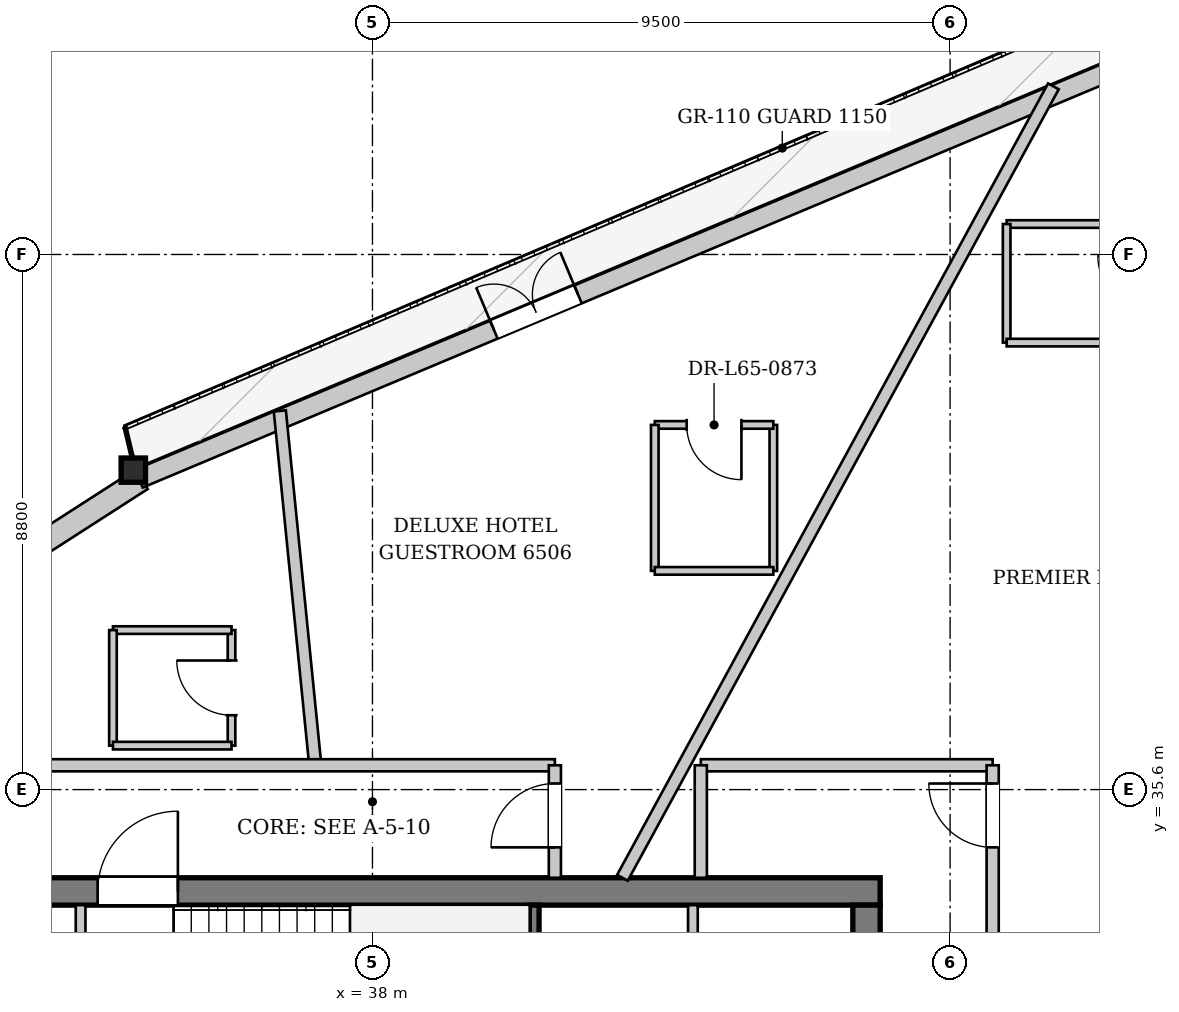
"""IFC4 building model, lengths in metres.
Left out: names, types, materials, properties, quantities, classifications, styles, units other than length and angle.
Written with IfcOpenShell. Run it as: python <this file> out.ifc"""

import sys

from ifc_helpers import new_model, si_unit, direction, frame, frame_2d, origin, origin_2d, place, context, subcontext, project, spatial, rectangle, i_section, extrude, source, transform, mapped, element, fill, save


model = new_model("IFC4")
c1 = context("Model", 3, precision=1e-05, world=origin(), true_north=direction((0.0, 1.0)))
c2 = subcontext(c1, "Body", "Model", "MODEL_VIEW")
j1 = project(units=[si_unit("LENGTHUNIT", "METRE"), si_unit("PLANEANGLEUNIT", "RADIAN")], contexts=[c1])
p1 = place(None, origin())
s1 = spatial("IfcSite", under=j1, at=p1, CompositionType="ELEMENT")
p2 = place(p1, origin())
s2 = spatial("IfcBuilding", under=s1, at=p2, CompositionType="ELEMENT")
p3 = place(p2, frame((0.0, 0.0, 245.3)))
s3 = spatial("IfcBuildingStorey", under=s2, at=p3, CompositionType="ELEMENT", Elevation=245.3)
m1 = source(origin(), c2, "Body", "SweptSolid", [
    extrude(i_section(OverallWidth=0.401, OverallDepth=0.399, WebThickness=0.022, FlangeThickness=0.034, at=origin_2d()), origin(), (0.0, 0.0, 1.0), 3.436),
])
p4 = place(p3, frame((34.098, 40.862, 0.0), z_axis=(-0.018120467412, -0.004974245956, 0.999823437182), x_axis=(0.264716981781, -0.964326147917, 0.0)))
e1 = element("IfcColumn", 1, at=p4, inside=s3, PredefinedType="COLUMN", context=c2, shape_type="MappedRepresentation", body=[
    mapped(m1, transform((0.0, 0.0, 0.0), x_axis=(1.0, 0.0, 0.0), y_axis=(0.0, 1.0, 0.0), z_axis=(0.0, 0.0, 1.0), scale=1.0)),
])
p5 = place(p3, frame((15.593, 28.735, 0.0), z_axis=(0.0, 0.0, 1.0), x_axis=(0.841061212788, 0.54093995632, 0.0)))
e2 = element("IfcWall", 2, at=p5, inside=s3, PredefinedType="SOLIDWALL", context=c2, shape_type="SweptSolid", body=[
    extrude(rectangle(XDim=22.124, YDim=0.38, at=frame_2d((11.062, 0.0))), origin(), (0.0, 0.0, 1.0), 2.872),
])
p6 = place(p5, frame((5.595, 0.0, 0.65)))
e3 = element("IfcOpeningElement", 3, at=p6, cuts=e2, PredefinedType="OPENING", context=c2, shape_type="SweptSolid", body=[
    extrude(rectangle(XDim=1.2, YDim=1.5, at=frame_2d((0.6, 0.75))), frame((0.0, 0.2, 0.0), z_axis=(0.0, -1.0, 0.0), x_axis=(1.0, 0.0, 0.0)), (0.0, 0.0, 1.0), 0.4),
])
p7 = place(p5, frame((16.929, 0.0, 0.65)))
e4 = element("IfcOpeningElement", 4, at=p7, cuts=e2, PredefinedType="OPENING", context=c2, shape_type="SweptSolid", body=[
    extrude(rectangle(XDim=1.2, YDim=1.5, at=frame_2d((0.6, 0.75))), frame((0.0, 0.2, 0.0), z_axis=(0.0, -1.0, 0.0), x_axis=(1.0, 0.0, 0.0)), (0.0, 0.0, 1.0), 0.4),
])
p8 = place(p3, frame((34.16, 40.715, 0.0), z_axis=(0.0, 0.0, 1.0), x_axis=(0.922135211304, 0.386867744937, 0.0)))
e5 = element("IfcWall", 5, at=p8, inside=s3, PredefinedType="SOLIDWALL", context=c2, shape_type="SweptSolid", body=[
    extrude(rectangle(XDim=22.124, YDim=0.32, at=frame_2d((11.062, 0.0))), origin(), (0.0, 0.0, 1.0), 2.872),
])
p9 = place(p8, frame((6.33, 0.0, 0.0)))
e6 = element("IfcOpeningElement", 6, at=p9, cuts=e5, PredefinedType="OPENING", context=c2, shape_type="SweptSolid", body=[
    extrude(rectangle(XDim=1.5, YDim=2.3, at=frame_2d((0.75, 1.15))), frame((0.0, 0.17, 0.0), z_axis=(0.0, -1.0, 0.0), x_axis=(1.0, 0.0, 0.0)), (0.0, 0.0, 1.0), 0.34),
])
p10 = place(p8, frame((17.272, 0.0, 0.402)))
e7 = element("IfcOpeningElement", 7, at=p10, cuts=e5, PredefinedType="OPENING", context=c2, shape_type="SweptSolid", body=[
    extrude(rectangle(XDim=2.6, YDim=2.35, at=frame_2d((1.3, 1.175))), frame((0.0, 0.17, 0.0), z_axis=(0.0, -1.0, 0.0), x_axis=(1.0, 0.0, 0.0)), (0.0, 0.0, 1.0), 0.34),
])
p11 = place(p3, frame((29.65, 33.925, 0.0), z_axis=(0.0, 0.0, 1.0), x_axis=(1.0, 0.0, 0.0)))
e8 = element("IfcWall", 8, at=p11, inside=s3, PredefinedType="SHEAR", context=c2, shape_type="SweptSolid", body=[
    extrude(rectangle(XDim=16.7, YDim=0.45, at=frame_2d((8.35, 0.0))), origin(), (0.0, 0.0, 1.0), 3.38),
])
p12 = place(p11, frame((1.45, 0.0, 0.0)))
e9 = element("IfcOpeningElement", 9, at=p12, cuts=e8, PredefinedType="OPENING", context=c2, shape_type="SweptSolid", body=[
    extrude(rectangle(XDim=0.95, YDim=2.1, at=frame_2d((0.475, 1.05))), frame((0.0, 0.235, 0.0), z_axis=(0.0, -1.0, 0.0), x_axis=(1.0, 0.0, 0.0)), (0.0, 0.0, 1.0), 0.47),
])
p13 = place(p11, frame((3.83, 0.0, 0.0)))
e10 = element("IfcOpeningElement", 10, at=p13, cuts=e8, PredefinedType="OPENING", context=c2, shape_type="SweptSolid", body=[
    extrude(rectangle(XDim=1.32, YDim=2.2, at=frame_2d((0.66, 1.1))), frame((0.0, 0.235, 0.0), z_axis=(0.0, -1.0, 0.0), x_axis=(1.0, 0.0, 0.0)), (0.0, 0.0, 1.0), 0.47),
])
p14 = place(p3, frame((46.125, 33.7, 0.0), z_axis=(0.0, 0.0, 1.0), x_axis=(0.0, -1.0, 0.0)))
e11 = element("IfcWall", 11, at=p14, inside=s3, PredefinedType="SHEAR", context=c2, shape_type="SweptSolid", body=[
    extrude(rectangle(XDim=14.2, YDim=0.45, at=frame_2d((7.1, 0.0))), origin(), (0.0, 0.0, 1.0), 3.38),
])
p15 = place(p14, frame((5.18, 0.0, 0.0)))
e12 = element("IfcOpeningElement", 12, at=p15, cuts=e11, PredefinedType="OPENING", context=c2, shape_type="SweptSolid", body=[
    extrude(rectangle(XDim=1.6, YDim=2.2, at=frame_2d((0.8, 1.1))), frame((0.0, 0.235, 0.0), z_axis=(0.0, -1.0, 0.0), x_axis=(1.0, 0.0, 0.0)), (0.0, 0.0, 1.0), 0.47),
])
p16 = place(p14, frame((2.05, 0.0, 0.0)))
e13 = element("IfcOpeningElement", 13, at=p16, cuts=e11, PredefinedType="OPENING", context=c2, shape_type="SweptSolid", body=[
    extrude(rectangle(XDim=0.95, YDim=2.1, at=frame_2d((0.475, 1.05))), frame((0.0, 0.235, 0.0), z_axis=(0.0, -1.0, 0.0), x_axis=(1.0, 0.0, 0.0)), (0.0, 0.0, 1.0), 0.47),
])
p17 = place(p3, frame((40.66, 30.6, 0.0), z_axis=(0.0, 0.0, 1.0), x_axis=(0.0, 1.0, 0.0)))
e14 = element("IfcWall", 14, at=p17, inside=s3, PredefinedType="PARTITIONING", context=c2, shape_type="SweptSolid", body=[
    extrude(rectangle(XDim=3.1, YDim=0.16, at=frame_2d((1.55, 0.0))), origin(), (0.0, 0.0, 1.0), 3.38),
])
p18 = place(p3, frame((33.2, 28.44, 0.0), z_axis=(0.0, 0.0, 1.0), x_axis=(0.0, 1.0, 0.0)))
e15 = element("IfcWall", 15, at=p18, inside=s3, PredefinedType="PARTITIONING", context=c2, shape_type="SweptSolid", body=[
    extrude(rectangle(XDim=5.26, YDim=0.16, at=frame_2d((2.63, 0.0))), origin(), (0.0, 0.0, 1.0), 3.38),
])
p19 = place(p3, frame((43.27, 30.68, 0.0), z_axis=(0.0, 0.0, 1.0), x_axis=(0.0, 1.0, 0.0)))
e16 = element("IfcWall", 16, at=p19, inside=s3, PredefinedType="PARTITIONING", context=c2, shape_type="SweptSolid", body=[
    extrude(rectangle(XDim=3.02, YDim=0.16, at=frame_2d((1.51, 0.0))), origin(), (0.0, 0.0, 1.0), 3.38),
])
p20 = place(p19, frame((0.95, 0.0, 0.0)))
e17 = element("IfcOpeningElement", 17, at=p20, cuts=e16, PredefinedType="OPENING", context=c2, shape_type="SweptSolid", body=[
    extrude(rectangle(XDim=0.95, YDim=2.1, at=frame_2d((0.475, 1.05))), frame((0.0, 0.09, 0.0), z_axis=(0.0, -1.0, 0.0), x_axis=(1.0, 0.0, 0.0)), (0.0, 0.0, 1.0), 0.18),
])
p21 = place(p3, frame((48.2, 31.829, 0.0), z_axis=(0.0, 0.0, 1.0), x_axis=(0.889862398015, 0.456229013324, 0.0)))
e18 = element("IfcWall", 18, at=p21, inside=s3, PredefinedType="PARTITIONING", context=c2, shape_type="SweptSolid", body=[
    extrude(rectangle(XDim=6.504, YDim=0.2, at=frame_2d((3.252, 0.0))), origin(), (0.0, 0.0, 1.0), 3.38),
])
p22 = place(p3, frame((42.112, 34.15, 0.0), z_axis=(0.0, 0.0, 1.0), x_axis=(0.478252978847, 0.878222117817, 0.0)))
e19 = element("IfcWall", 19, at=p22, inside=s3, PredefinedType="PARTITIONING", context=c2, shape_type="SweptSolid", body=[
    extrude(rectangle(XDim=14.82, YDim=0.2, at=frame_2d((7.41, 0.0))), origin(), (0.0, 0.0, 1.0), 3.38),
])
p23 = place(p3, frame((37.059, 36.0, 0.0), z_axis=(0.0, 0.0, 1.0), x_axis=(-0.099549120858, 0.99503264898, 0.0)))
e20 = element("IfcWall", 20, at=p23, inside=s3, PredefinedType="PARTITIONING", context=c2, shape_type="SweptSolid", body=[
    extrude(rectangle(XDim=5.856, YDim=0.2, at=frame_2d((2.928, 0.0))), origin(), (0.0, 0.0, 1.0), 3.38),
])
p24 = place(p3, frame((50.83, 44.901, 0.0), z_axis=(0.0, 0.0, 1.0), x_axis=(-1.0, 0.0, 0.0)))
e21 = element("IfcWall", 21, at=p24, inside=s3, PredefinedType="PARTITIONING", context=c2, shape_type="SweptSolid", body=[
    extrude(rectangle(XDim=2.4, YDim=0.125, at=frame_2d((1.2, 0.0))), origin(), (0.0, 0.0, 1.0), 3.38),
])
p25 = place(p3, frame((48.43, 44.901, 0.0), z_axis=(0.0, 0.0, 1.0), x_axis=(0.0, -1.0, 0.0)))
e22 = element("IfcWall", 22, at=p25, inside=s3, PredefinedType="PARTITIONING", context=c2, shape_type="SweptSolid", body=[
    extrude(rectangle(XDim=1.95, YDim=0.125, at=frame_2d((0.975, 0.0))), origin(), (0.0, 0.0, 1.0), 3.38),
])
p26 = place(p3, frame((48.43, 42.951, 0.0), z_axis=(0.0, 0.0, 1.0), x_axis=(1.0, 0.0, 0.0)))
e23 = element("IfcWall", 23, at=p26, inside=s3, PredefinedType="PARTITIONING", context=c2, shape_type="SweptSolid", body=[
    extrude(rectangle(XDim=2.4, YDim=0.125, at=frame_2d((1.2, 0.0))), origin(), (0.0, 0.0, 1.0), 3.125),
])
p27 = place(p3, frame((44.593, 39.197, 0.0), z_axis=(0.0, 0.0, 1.0), x_axis=(0.0, 1.0, 0.0)))
e24 = element("IfcWall", 24, at=p27, inside=s3, PredefinedType="PARTITIONING", context=c2, shape_type="SweptSolid", body=[
    extrude(rectangle(XDim=2.4, YDim=0.125, at=frame_2d((1.2, 0.0))), origin(), (0.0, 0.0, 1.0), 3.38),
])
p28 = place(p3, frame((44.593, 41.597, 0.0), z_axis=(0.0, 0.0, 1.0), x_axis=(-1.0, 0.0, 0.0)))
e25 = element("IfcWall", 25, at=p28, inside=s3, PredefinedType="PARTITIONING", context=c2, shape_type="SweptSolid", body=[
    extrude(rectangle(XDim=1.95, YDim=0.125, at=frame_2d((0.975, 0.0))), origin(), (0.0, 0.0, 1.0), 3.125),
])
p29 = place(p28, frame((0.525, 0.0, 0.0)))
e26 = element("IfcOpeningElement", 26, at=p29, cuts=e25, PredefinedType="OPENING", context=c2, shape_type="SweptSolid", body=[
    extrude(rectangle(XDim=0.9, YDim=2.1, at=frame_2d((0.45, 1.05))), frame((0.0, 0.073, 0.0), z_axis=(0.0, -1.0, 0.0), x_axis=(1.0, 0.0, 0.0)), (0.0, 0.0, 1.0), 0.145),
])
p30 = place(p3, frame((42.643, 41.597, 0.0), z_axis=(0.0, 0.0, 1.0), x_axis=(0.0, -1.0, 0.0)))
e27 = element("IfcWall", 27, at=p30, inside=s3, PredefinedType="PARTITIONING", context=c2, shape_type="SweptSolid", body=[
    extrude(rectangle(XDim=2.4, YDim=0.125, at=frame_2d((1.2, 0.0))), origin(), (0.0, 0.0, 1.0), 3.38),
])
p31 = place(p3, frame((42.643, 39.197, 0.0), z_axis=(0.0, 0.0, 1.0), x_axis=(1.0, 0.0, 0.0)))
e28 = element("IfcWall", 28, at=p31, inside=s3, PredefinedType="PARTITIONING", context=c2, shape_type="SweptSolid", body=[
    extrude(rectangle(XDim=1.95, YDim=0.125, at=frame_2d((0.975, 0.0))), origin(), (0.0, 0.0, 1.0), 3.38),
])
p32 = place(p3, frame((35.682, 36.323, 0.0), z_axis=(0.0, 0.0, 1.0), x_axis=(0.0, 1.0, 0.0)))
e29 = element("IfcWall", 29, at=p32, inside=s3, PredefinedType="PARTITIONING", context=c2, shape_type="SweptSolid", body=[
    extrude(rectangle(XDim=1.9, YDim=0.125, at=frame_2d((0.95, 0.0))), origin(), (0.0, 0.0, 1.0), 3.38),
])
p33 = place(p32, frame((0.5, 0.0, 0.0)))
e30 = element("IfcOpeningElement", 30, at=p33, cuts=e29, PredefinedType="OPENING", context=c2, shape_type="SweptSolid", body=[
    extrude(rectangle(XDim=0.9, YDim=2.1, at=frame_2d((0.45, 1.05))), frame((0.0, 0.073, 0.0), z_axis=(0.0, -1.0, 0.0), x_axis=(1.0, 0.0, 0.0)), (0.0, 0.0, 1.0), 0.145),
])
p34 = place(p3, frame((35.682, 38.223, 0.0), z_axis=(0.0, 0.0, 1.0), x_axis=(-1.0, 0.0, 0.0)))
e31 = element("IfcWall", 31, at=p34, inside=s3, PredefinedType="PARTITIONING", context=c2, shape_type="SweptSolid", body=[
    extrude(rectangle(XDim=1.95, YDim=0.125, at=frame_2d((0.975, 0.0))), origin(), (0.0, 0.0, 1.0), 3.125),
])
p35 = place(p3, frame((33.732, 38.223, 0.0), z_axis=(0.0, 0.0, 1.0), x_axis=(0.0, -1.0, 0.0)))
e32 = element("IfcWall", 32, at=p35, inside=s3, PredefinedType="PARTITIONING", context=c2, shape_type="SweptSolid", body=[
    extrude(rectangle(XDim=1.9, YDim=0.125, at=frame_2d((0.95, 0.0))), origin(), (0.0, 0.0, 1.0), 3.38),
])
p36 = place(p3, frame((33.732, 36.323, 0.0), z_axis=(0.0, 0.0, 1.0), x_axis=(1.0, 0.0, 0.0)))
e33 = element("IfcWall", 33, at=p36, inside=s3, PredefinedType="PARTITIONING", context=c2, shape_type="SweptSolid", body=[
    extrude(rectangle(XDim=1.95, YDim=0.125, at=frame_2d((0.975, 0.0))), origin(), (0.0, 0.0, 1.0), 3.38),
])
p37 = place(p3, frame((27.8, 36.0, 0.0), z_axis=(0.0, 0.0, 1.0), x_axis=(1.0, 0.0, 0.0)))
e34 = element("IfcWall", 34, at=p37, inside=s3, PredefinedType="PARTITIONING", context=c2, shape_type="SweptSolid", body=[
    extrude(rectangle(XDim=13.2, YDim=0.2, at=frame_2d((6.6, 0.0))), origin(), (0.0, 0.0, 1.0), 3.38),
])
p38 = place(p37, frame((3.484, 0.0, 0.0)))
e35 = element("IfcOpeningElement", 35, at=p38, cuts=e34, PredefinedType="OPENING", context=c2, shape_type="SweptSolid", body=[
    extrude(rectangle(XDim=1.05, YDim=2.2, at=frame_2d((0.525, 1.1))), frame((0.0, 0.11, 0.0), z_axis=(0.0, -1.0, 0.0), x_axis=(1.0, 0.0, 0.0)), (0.0, 0.0, 1.0), 0.22),
])
p39 = place(p37, frame((0.3, 0.0, 0.0)))
e36 = element("IfcOpeningElement", 36, at=p39, cuts=e34, PredefinedType="OPENING", context=c2, shape_type="SweptSolid", body=[
    extrude(rectangle(XDim=1.05, YDim=2.2, at=frame_2d((0.525, 1.1))), frame((0.0, 0.11, 0.0), z_axis=(0.0, -1.0, 0.0), x_axis=(1.0, 0.0, 0.0)), (0.0, 0.0, 1.0), 0.22),
])
p40 = place(p3, frame((41.0, 34.15, 0.0), z_axis=(0.0, 0.0, 1.0), x_axis=(0.0, 1.0, 0.0)))
e37 = element("IfcWall", 37, at=p40, inside=s3, PredefinedType="PARTITIONING", context=c2, shape_type="SweptSolid", body=[
    extrude(rectangle(XDim=1.85, YDim=0.2, at=frame_2d((0.925, 0.0))), origin(), (0.0, 0.0, 1.0), 3.38),
])
p41 = place(p40, frame((0.5, 0.0, 0.0)))
e38 = element("IfcOpeningElement", 38, at=p41, cuts=e37, PredefinedType="OPENING", context=c2, shape_type="SweptSolid", body=[
    extrude(rectangle(XDim=1.05, YDim=2.2, at=frame_2d((0.525, 1.1))), frame((0.0, 0.11, 0.0), z_axis=(0.0, -1.0, 0.0), x_axis=(1.0, 0.0, 0.0)), (0.0, 0.0, 1.0), 0.22),
])
p42 = place(p3, frame((43.4, 36.0, 0.0), z_axis=(0.0, 0.0, 1.0), x_axis=(1.0, 0.0, 0.0)))
e39 = element("IfcWall", 39, at=p42, inside=s3, PredefinedType="PARTITIONING", context=c2, shape_type="SweptSolid", body=[
    extrude(rectangle(XDim=4.8, YDim=0.2, at=frame_2d((2.4, 0.0))), origin(), (0.0, 0.0, 1.0), 3.38),
])
p43 = place(p3, frame((43.4, 34.15, 0.0), z_axis=(0.0, 0.0, 1.0), x_axis=(0.0, 1.0, 0.0)))
e40 = element("IfcWall", 40, at=p43, inside=s3, PredefinedType="PARTITIONING", context=c2, shape_type="SweptSolid", body=[
    extrude(rectangle(XDim=1.85, YDim=0.2, at=frame_2d((0.925, 0.0))), origin(), (0.0, 0.0, 1.0), 3.38),
])
p44 = place(p3, frame((48.2, 17.2, 0.0), z_axis=(0.0, 0.0, 1.0), x_axis=(0.0, 1.0, 0.0)))
e41 = element("IfcWall", 41, at=p44, inside=s3, PredefinedType="PARTITIONING", context=c2, shape_type="SweptSolid", body=[
    extrude(rectangle(XDim=18.8, YDim=0.2, at=frame_2d((9.4, 0.0))), origin(), (0.0, 0.0, 1.0), 3.065),
])
p45 = place(p44, frame((3.467, 0.0, 0.0)))
e42 = element("IfcOpeningElement", 42, at=p45, cuts=e41, PredefinedType="OPENING", context=c2, shape_type="SweptSolid", body=[
    extrude(rectangle(XDim=1.05, YDim=2.2, at=frame_2d((0.525, 1.1))), frame((0.0, 0.11, 0.0), z_axis=(0.0, -1.0, 0.0), x_axis=(1.0, 0.0, 0.0)), (0.0, 0.0, 1.0), 0.22),
])
p46 = place(p44, frame((10.22, 0.0, 0.0)))
e43 = element("IfcOpeningElement", 43, at=p46, cuts=e41, PredefinedType="OPENING", context=c2, shape_type="SweptSolid", body=[
    extrude(rectangle(XDim=1.05, YDim=2.2, at=frame_2d((0.525, 1.1))), frame((0.0, 0.11, 0.0), z_axis=(0.0, -1.0, 0.0), x_axis=(1.0, 0.0, 0.0)), (0.0, 0.0, 1.0), 0.22),
])
p47 = place(p44, frame((17.45, 0.0, 0.0)))
e44 = element("IfcOpeningElement", 44, at=p47, cuts=e41, PredefinedType="OPENING", context=c2, shape_type="SweptSolid", body=[
    extrude(rectangle(XDim=1.05, YDim=2.2, at=frame_2d((0.525, 1.1))), frame((0.0, 0.11, 0.0), z_axis=(0.0, -1.0, 0.0), x_axis=(1.0, 0.0, 0.0)), (0.0, 0.0, 1.0), 0.22),
])
m2 = source(origin(), c2, "Body", "SweptSolid", [
    extrude(rectangle(XDim=1.5, YDim=2.3, at=frame_2d((0.75, 1.15))), frame((0.0, 0.025, 0.0), z_axis=(0.0, -1.0, 0.0), x_axis=(1.0, 0.0, 0.0)), (0.0, 0.0, 1.0), 0.05),
])
p48 = place(p9, origin())
e45 = element("IfcDoor", 45, at=p48, inside=s3, OperationType="DOUBLE_DOOR_SINGLE_SWING", PredefinedType="DOOR", context=c2, shape_type="MappedRepresentation", body=[
    mapped(m2, transform((0.0, 0.0, 0.0), x_axis=(1.0, 0.0, 0.0), y_axis=(0.0, 1.0, 0.0), z_axis=(0.0, 0.0, 1.0), scale=1.0)),
])
fill(e6, e45)
m3 = source(origin(), c2, "Body", "SweptSolid", [
    extrude(rectangle(XDim=1.32, YDim=2.2, at=frame_2d((0.66, 1.1))), frame((0.0, 0.025, 0.0), z_axis=(0.0, -1.0, 0.0), x_axis=(1.0, 0.0, 0.0)), (0.0, 0.0, 1.0), 0.05),
])
p49 = place(p13, origin())
e46 = element("IfcDoor", 46, at=p49, inside=s3, OperationType="SINGLE_SWING_RIGHT", PredefinedType="DOOR", context=c2, shape_type="MappedRepresentation", body=[
    mapped(m3, transform((0.0, 0.0, 0.0), x_axis=(1.0, 0.0, 0.0), y_axis=(0.0, 1.0, 0.0), z_axis=(0.0, 0.0, 1.0), scale=1.0)),
])
fill(e10, e46)
m4 = source(origin(), c2, "Body", "SweptSolid", [
    extrude(rectangle(XDim=0.9, YDim=2.1, at=frame_2d((0.45, 1.05))), frame((0.0, 0.025, 0.0), z_axis=(0.0, -1.0, 0.0), x_axis=(1.0, 0.0, 0.0)), (0.0, 0.0, 1.0), 0.05),
])
p50 = place(p29, origin())
e47 = element("IfcDoor", 47, at=p50, inside=s3, OperationType="SINGLE_SWING_LEFT", PredefinedType="DOOR", context=c2, shape_type="MappedRepresentation", body=[
    mapped(m4, transform((0.0, 0.0, 0.0), x_axis=(1.0, 0.0, 0.0), y_axis=(0.0, 1.0, 0.0), z_axis=(0.0, 0.0, 1.0), scale=1.0)),
])
fill(e26, e47)
p51 = place(p33, origin())
e48 = element("IfcDoor", 48, at=p51, inside=s3, OperationType="SINGLE_SWING_RIGHT", PredefinedType="DOOR", context=c2, shape_type="MappedRepresentation", body=[
    mapped(m4, transform((0.0, 0.0, 0.0), x_axis=(1.0, 0.0, 0.0), y_axis=(0.0, 1.0, 0.0), z_axis=(0.0, 0.0, 1.0), scale=1.0)),
])
fill(e30, e48)
m5 = source(origin(), c2, "Body", "SweptSolid", [
    extrude(rectangle(XDim=1.05, YDim=2.2, at=frame_2d((0.525, 1.1))), frame((0.0, 0.025, 0.0), z_axis=(0.0, -1.0, 0.0), x_axis=(1.0, 0.0, 0.0)), (0.0, 0.0, 1.0), 0.05),
])
p52 = place(p41, origin())
e49 = element("IfcDoor", 49, at=p52, inside=s3, OperationType="SINGLE_SWING_LEFT", PredefinedType="DOOR", context=c2, shape_type="MappedRepresentation", body=[
    mapped(m5, transform((0.0, 0.0, 0.0), x_axis=(1.0, 0.0, 0.0), y_axis=(0.0, 1.0, 0.0), z_axis=(0.0, 0.0, 1.0), scale=1.0)),
])
fill(e38, e49)
p53 = place(p47, origin())
e50 = element("IfcDoor", 50, at=p53, inside=s3, OperationType="SINGLE_SWING_RIGHT", PredefinedType="DOOR", context=c2, shape_type="MappedRepresentation", body=[
    mapped(m5, transform((0.0, 0.0, 0.0), x_axis=(1.0, 0.0, 0.0), y_axis=(0.0, 1.0, 0.0), z_axis=(0.0, 0.0, 1.0), scale=1.0)),
])
fill(e44, e50)
save(model, sys.argv[1])
